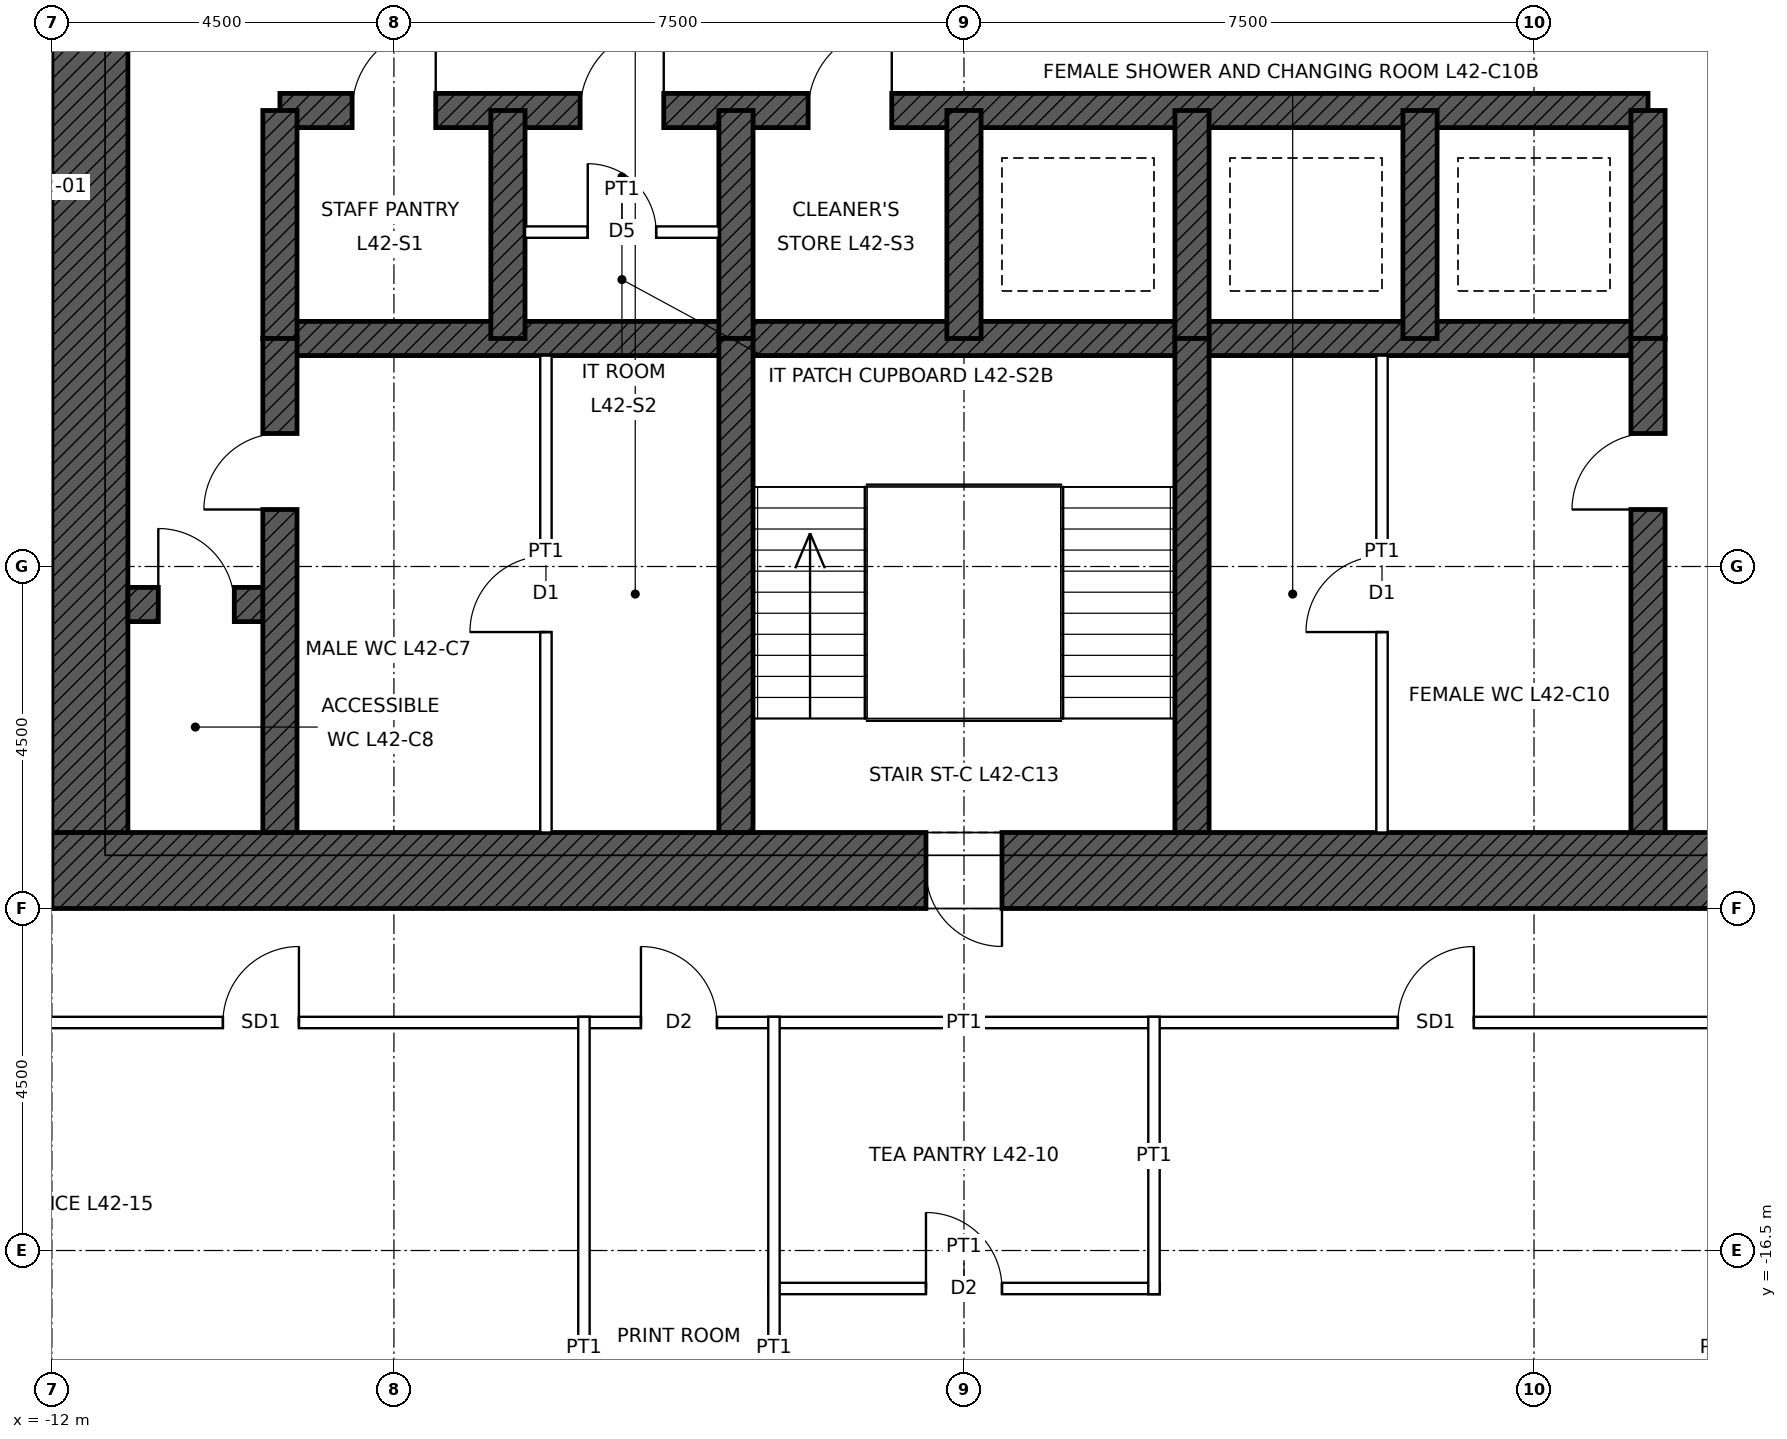
"""IFC4 building model, lengths in metres.
Left out: names, types, materials, properties, quantities, classifications, styles, units other than length and angle.
Written with IfcOpenShell. Run it as: python <this file> out.ifc"""

import sys

from ifc_helpers import new_model, si_unit, direction, frame, frame_2d, origin, place, context, subcontext, project, spatial, rectangle, extrude, element, fill, save


model = new_model("IFC4")
c1 = context("Model", 3, precision=1e-05, world=origin(), true_north=direction((0.0, 1.0)))
c2 = subcontext(c1, "Body", "Model", "MODEL_VIEW")
j1 = project(units=[si_unit("LENGTHUNIT", "METRE"), si_unit("PLANEANGLEUNIT", "RADIAN")], contexts=[c1])
p1 = place(None, origin())
s1 = spatial("IfcSite", under=j1, at=p1, CompositionType="ELEMENT")
p2 = place(p1, origin())
s2 = spatial("IfcBuilding", under=s1, at=p2, CompositionType="ELEMENT")
p3 = place(p2, frame((0.0, 0.0, 201.9)))
s3 = spatial("IfcBuildingStorey", under=s2, at=p3, CompositionType="ELEMENT", Elevation=201.9)
p4 = place(p3, frame((12.0, -11.5, 0.0), z_axis=(0.0, 0.0, 1.0), x_axis=(-1.0, 0.0, 0.0)))
e1 = element("IfcWall", 1, at=p4, inside=s3, PredefinedType="SHEAR", context=c2, shape_type="SweptSolid", body=[
    extrude(rectangle(XDim=24.0, YDim=1.0, at=frame_2d((12.0, 0.0))), origin(), (0.0, 0.0, 1.0), 4.0),
])
p5 = place(p4, frame((11.5, 0.0, 0.0)))
e2 = element("IfcOpeningElement", 2, at=p5, cuts=e1, PredefinedType="OPENING", context=c2, shape_type="SweptSolid", body=[
    extrude(rectangle(XDim=1.0, YDim=2.1, at=frame_2d((0.5, 1.05))), frame((0.0, 0.51, 0.0), z_axis=(0.0, -1.0, 0.0), x_axis=(1.0, 0.0, 0.0)), (0.0, 0.0, 1.0), 1.02),
])
p6 = place(p4, frame((1.0, 0.0, 0.0)))
e3 = element("IfcOpeningElement", 3, at=p6, cuts=e1, PredefinedType="OPENING", context=c2, shape_type="SweptSolid", body=[
    extrude(rectangle(XDim=1.0, YDim=2.4, at=frame_2d((0.5, 1.2))), frame((0.0, 0.51, 0.0), z_axis=(0.0, -1.0, 0.0), x_axis=(1.0, 0.0, 0.0)), (0.0, 0.0, 1.0), 1.02),
])
p7 = place(p3, frame((-11.5, -11.0, 0.0), z_axis=(0.0, 0.0, 1.0), x_axis=(0.0, 1.0, 0.0)))
e4 = element("IfcWall", 4, at=p7, inside=s3, PredefinedType="SHEAR", context=c2, shape_type="SweptSolid", body=[
    extrude(rectangle(XDim=22.0, YDim=1.0, at=frame_2d((11.0, 0.0))), origin(), (0.0, 0.0, 1.0), 4.0),
])
p8 = place(p7, frame((10.5, 0.0, 0.0)))
e5 = element("IfcOpeningElement", 5, at=p8, cuts=e4, PredefinedType="OPENING", context=c2, shape_type="SweptSolid", body=[
    extrude(rectangle(XDim=1.0, YDim=2.4, at=frame_2d((0.5, 1.2))), frame((0.0, 0.51, 0.0), z_axis=(0.0, -1.0, 0.0), x_axis=(1.0, 0.0, 0.0)), (0.0, 0.0, 1.0), 1.02),
])
p9 = place(p3, frame((-9.0, -1.5, 0.0), z_axis=(0.0, 0.0, 1.0), x_axis=(1.0, 0.0, 0.0)))
e6 = element("IfcWall", 6, at=p9, inside=s3, PredefinedType="SHEAR", context=c2, shape_type="SweptSolid", body=[
    extrude(rectangle(XDim=18.0, YDim=0.45, at=frame_2d((9.0, 0.0))), origin(), (0.0, 0.0, 1.0), 4.0),
])
p10 = place(p9, frame((0.95, 0.0, 0.0)))
e7 = element("IfcOpeningElement", 7, at=p10, cuts=e6, PredefinedType="OPENING", context=c2, shape_type="SweptSolid", body=[
    extrude(rectangle(XDim=1.1, YDim=2.1, at=frame_2d((0.55, 1.05))), frame((0.0, 0.235, 0.0), z_axis=(0.0, -1.0, 0.0), x_axis=(1.0, 0.0, 0.0)), (0.0, 0.0, 1.0), 0.47),
])
p11 = place(p9, frame((3.95, 0.0, 0.0)))
e8 = element("IfcOpeningElement", 8, at=p11, cuts=e6, PredefinedType="OPENING", context=c2, shape_type="SweptSolid", body=[
    extrude(rectangle(XDim=1.1, YDim=2.1, at=frame_2d((0.55, 1.05))), frame((0.0, 0.235, 0.0), z_axis=(0.0, -1.0, 0.0), x_axis=(1.0, 0.0, 0.0)), (0.0, 0.0, 1.0), 0.47),
])
p12 = place(p9, frame((6.95, 0.0, 0.0)))
e9 = element("IfcOpeningElement", 9, at=p12, cuts=e6, PredefinedType="OPENING", context=c2, shape_type="SweptSolid", body=[
    extrude(rectangle(XDim=1.1, YDim=2.1, at=frame_2d((0.55, 1.05))), frame((0.0, 0.235, 0.0), z_axis=(0.0, -1.0, 0.0), x_axis=(1.0, 0.0, 0.0)), (0.0, 0.0, 1.0), 0.47),
])
p13 = place(p3, frame((-9.0, -4.5, 0.0), z_axis=(0.0, 0.0, 1.0), x_axis=(1.0, 0.0, 0.0)))
e10 = element("IfcWall", 10, at=p13, inside=s3, PredefinedType="SHEAR", context=c2, shape_type="SweptSolid", body=[
    extrude(rectangle(XDim=18.0, YDim=0.45, at=frame_2d((9.0, 0.0))), origin(), (0.0, 0.0, 1.0), 4.0),
])
p14 = place(p3, frame((-11.0, -8.0, 0.0), z_axis=(0.0, 0.0, 1.0), x_axis=(1.0, 0.0, 0.0)))
e11 = element("IfcWall", 11, at=p14, inside=s3, PredefinedType="SHEAR", context=c2, shape_type="SweptSolid", body=[
    extrude(rectangle(XDim=2.0, YDim=0.45, at=frame_2d((1.0, 0.0))), origin(), (0.0, 0.0, 1.0), 4.0),
])
p15 = place(p14, frame((0.4, 0.0, 0.0)))
e12 = element("IfcOpeningElement", 12, at=p15, cuts=e11, PredefinedType="OPENING", context=c2, shape_type="SweptSolid", body=[
    extrude(rectangle(XDim=1.0, YDim=2.1, at=frame_2d((0.5, 1.05))), frame((0.0, 0.235, 0.0), z_axis=(0.0, -1.0, 0.0), x_axis=(1.0, 0.0, 0.0)), (0.0, 0.0, 1.0), 0.47),
])
for number, where, z_axis, x_axis in (
    (13, (-9.0, -4.5, 0.0), (0.0, 0.0, 1.0), (0.0, 1.0, 0.0)),
    (14, (9.0, -4.5, 0.0), (0.0, 0.0, 1.0), (0.0, 1.0, 0.0)),
    (15, (-6.0, -4.5, 0.0), (0.0, 0.0, 1.0), (0.0, 1.0, 0.0)),
    (16, (-3.0, -4.5, 0.0), (0.0, 0.0, 1.0), (0.0, 1.0, 0.0)),
    (17, (0.0, -4.5, 0.0), (0.0, 0.0, 1.0), (0.0, 1.0, 0.0)),
    (18, (3.0, -4.5, 0.0), (0.0, 0.0, 1.0), (0.0, 1.0, 0.0)),
    (19, (6.0, -4.5, 0.0), (0.0, 0.0, 1.0), (0.0, 1.0, 0.0)),
):
    element("IfcWall", number, at=place(p3, frame(where, z_axis=z_axis, x_axis=x_axis)), inside=s3, PredefinedType="SHEAR", context=c2, shape_type="SweptSolid", body=[
        extrude(rectangle(XDim=3.0, YDim=0.45, at=frame_2d((1.5, 0.0))), origin(), (0.0, 0.0, 1.0), 4.0),
    ])
p16 = place(p3, frame((-9.0, -11.0, 0.0), z_axis=(0.0, 0.0, 1.0), x_axis=(0.0, 1.0, 0.0)))
e20 = element("IfcWall", 20, at=p16, inside=s3, PredefinedType="SHEAR", context=c2, shape_type="SweptSolid", body=[
    extrude(rectangle(XDim=6.5, YDim=0.45, at=frame_2d((3.25, 0.0))), origin(), (0.0, 0.0, 1.0), 4.0),
])
p17 = place(p16, frame((4.25, 0.0, 0.0)))
e21 = element("IfcOpeningElement", 21, at=p17, cuts=e20, PredefinedType="OPENING", context=c2, shape_type="SweptSolid", body=[
    extrude(rectangle(XDim=1.0, YDim=2.1, at=frame_2d((0.5, 1.05))), frame((0.0, 0.235, 0.0), z_axis=(0.0, -1.0, 0.0), x_axis=(1.0, 0.0, 0.0)), (0.0, 0.0, 1.0), 0.47),
])
p18 = place(p3, frame((9.0, -11.0, 0.0), z_axis=(0.0, 0.0, 1.0), x_axis=(0.0, 1.0, 0.0)))
e22 = element("IfcWall", 22, at=p18, inside=s3, PredefinedType="SHEAR", context=c2, shape_type="SweptSolid", body=[
    extrude(rectangle(XDim=6.5, YDim=0.45, at=frame_2d((3.25, 0.0))), origin(), (0.0, 0.0, 1.0), 4.0),
])
p19 = place(p18, frame((4.25, 0.0, 0.0)))
e23 = element("IfcOpeningElement", 23, at=p19, cuts=e22, PredefinedType="OPENING", context=c2, shape_type="SweptSolid", body=[
    extrude(rectangle(XDim=1.0, YDim=2.1, at=frame_2d((0.5, 1.05))), frame((0.0, 0.235, 0.0), z_axis=(0.0, -1.0, 0.0), x_axis=(1.0, 0.0, 0.0)), (0.0, 0.0, 1.0), 0.47),
])
for number, where, z_axis, x_axis in (
    (24, (-3.0, -11.0, 0.0), (0.0, 0.0, 1.0), (0.0, 1.0, 0.0)),
    (25, (3.0, -11.0, 0.0), (0.0, 0.0, 1.0), (0.0, 1.0, 0.0)),
):
    element("IfcWall", number, at=place(p3, frame(where, z_axis=z_axis, x_axis=x_axis)), inside=s3, PredefinedType="SHEAR", context=c2, shape_type="SweptSolid", body=[
        extrude(rectangle(XDim=6.5, YDim=0.45, at=frame_2d((3.25, 0.0))), origin(), (0.0, 0.0, 1.0), 4.0),
    ])
p20 = place(p3, frame((-2.575, -17.0, 0.0), z_axis=(0.0, 0.0, 1.0), x_axis=(1.0, 0.0, 0.0)))
e26 = element("IfcWall", 26, at=p20, inside=s3, PredefinedType="PARTITIONING", context=c2, shape_type="SweptSolid", body=[
    extrude(rectangle(XDim=5.15, YDim=0.15, at=frame_2d((2.575, 0.0))), origin(), (0.0, 0.0, 1.0), 3.85),
])
p21 = place(p20, frame((2.075, 0.0, 0.0)))
e27 = element("IfcOpeningElement", 27, at=p21, cuts=e26, PredefinedType="OPENING", context=c2, shape_type="SweptSolid", body=[
    extrude(rectangle(XDim=1.0, YDim=2.1, at=frame_2d((0.5, 1.05))), frame((0.0, 0.085, 0.0), z_axis=(0.0, -1.0, 0.0), x_axis=(1.0, 0.0, 0.0)), (0.0, 0.0, 1.0), 0.17),
])
p22 = place(p3, frame((-13.575, -13.5, 0.0), z_axis=(0.0, 0.0, 1.0), x_axis=(1.0, 0.0, 0.0)))
e28 = element("IfcWall", 28, at=p22, inside=s3, PredefinedType="PARTITIONING", context=c2, shape_type="SweptSolid", body=[
    extrude(rectangle(XDim=27.15, YDim=0.15, at=frame_2d((13.575, 0.0))), origin(), (0.0, 0.0, 1.0), 3.85),
])
p23 = place(p22, frame((19.283, 0.0, 0.0)))
e29 = element("IfcOpeningElement", 29, at=p23, cuts=e28, PredefinedType="OPENING", context=c2, shape_type="SweptSolid", body=[
    extrude(rectangle(XDim=1.0, YDim=2.4, at=frame_2d((0.5, 1.2))), frame((0.0, 0.085, 0.0), z_axis=(0.0, -1.0, 0.0), x_axis=(1.0, 0.0, 0.0)), (0.0, 0.0, 1.0), 0.17),
])
p24 = place(p22, frame((9.325, 0.0, 0.0)))
e30 = element("IfcOpeningElement", 30, at=p24, cuts=e28, PredefinedType="OPENING", context=c2, shape_type="SweptSolid", body=[
    extrude(rectangle(XDim=1.0, YDim=2.1, at=frame_2d((0.5, 1.05))), frame((0.0, 0.085, 0.0), z_axis=(0.0, -1.0, 0.0), x_axis=(1.0, 0.0, 0.0)), (0.0, 0.0, 1.0), 0.17),
])
p25 = place(p22, frame((3.825, 0.0, 0.0)))
e31 = element("IfcOpeningElement", 31, at=p25, cuts=e28, PredefinedType="OPENING", context=c2, shape_type="SweptSolid", body=[
    extrude(rectangle(XDim=1.0, YDim=2.4, at=frame_2d((0.5, 1.2))), frame((0.0, 0.085, 0.0), z_axis=(0.0, -1.0, 0.0), x_axis=(1.0, 0.0, 0.0)), (0.0, 0.0, 1.0), 0.17),
])
p26 = place(p22, frame((25.318, 0.0, 0.0)))
e32 = element("IfcOpeningElement", 32, at=p26, cuts=e28, PredefinedType="OPENING", context=c2, shape_type="SweptSolid", body=[
    extrude(rectangle(XDim=1.0, YDim=2.4, at=frame_2d((0.5, 1.2))), frame((0.0, 0.085, 0.0), z_axis=(0.0, -1.0, 0.0), x_axis=(1.0, 0.0, 0.0)), (0.0, 0.0, 1.0), 0.17),
])
for number, where, z_axis, x_axis in (
    (33, (-5.0, -22.15, 0.0), (0.0, 0.0, 1.0), (0.0, 1.0, 0.0)),
    (34, (-2.5, -22.15, 0.0), (0.0, 0.0, 1.0), (0.0, 1.0, 0.0)),
):
    element("IfcWall", number, at=place(p3, frame(where, z_axis=z_axis, x_axis=x_axis)), inside=s3, PredefinedType="PARTITIONING", context=c2, shape_type="SweptSolid", body=[
        extrude(rectangle(XDim=8.725, YDim=0.15, at=frame_2d((4.362, 0.0))), origin(), (0.0, 0.0, 1.0), 3.85),
    ])
p27 = place(p3, frame((2.5, -17.075, 0.0), z_axis=(0.0, 0.0, 1.0), x_axis=(0.0, 1.0, 0.0)))
e35 = element("IfcWall", 35, at=p27, inside=s3, PredefinedType="PARTITIONING", context=c2, shape_type="SweptSolid", body=[
    extrude(rectangle(XDim=3.65, YDim=0.15, at=frame_2d((1.825, 0.0))), origin(), (0.0, 0.0, 1.0), 3.85),
])
p28 = place(p3, frame((-5.5, -11.0, 0.0), z_axis=(0.0, 0.0, 1.0), x_axis=(0.0, 1.0, 0.0)))
e36 = element("IfcWall", 36, at=p28, inside=s3, PredefinedType="PARTITIONING", context=c2, shape_type="SweptSolid", body=[
    extrude(rectangle(XDim=6.275, YDim=0.15, at=frame_2d((3.137, 0.0))), origin(), (0.0, 0.0, 1.0), 3.75),
])
p29 = place(p28, frame((2.637, 0.0, 0.0)))
e37 = element("IfcOpeningElement", 37, at=p29, cuts=e36, PredefinedType="OPENING", context=c2, shape_type="SweptSolid", body=[
    extrude(rectangle(XDim=1.0, YDim=2.1, at=frame_2d((0.5, 1.05))), frame((0.0, 0.085, 0.0), z_axis=(0.0, -1.0, 0.0), x_axis=(1.0, 0.0, 0.0)), (0.0, 0.0, 1.0), 0.17),
])
p30 = place(p3, frame((5.5, -11.0, 0.0), z_axis=(0.0, 0.0, 1.0), x_axis=(0.0, 1.0, 0.0)))
e38 = element("IfcWall", 38, at=p30, inside=s3, PredefinedType="PARTITIONING", context=c2, shape_type="SweptSolid", body=[
    extrude(rectangle(XDim=6.275, YDim=0.15, at=frame_2d((3.137, 0.0))), origin(), (0.0, 0.0, 1.0), 3.75),
])
p31 = place(p30, frame((2.637, 0.0, 0.0)))
e39 = element("IfcOpeningElement", 39, at=p31, cuts=e38, PredefinedType="OPENING", context=c2, shape_type="SweptSolid", body=[
    extrude(rectangle(XDim=1.0, YDim=2.1, at=frame_2d((0.5, 1.05))), frame((0.0, 0.085, 0.0), z_axis=(0.0, -1.0, 0.0), x_axis=(1.0, 0.0, 0.0)), (0.0, 0.0, 1.0), 0.17),
])
p32 = place(p3, frame((-5.775, -3.1, 0.0), z_axis=(0.0, 0.0, 1.0), x_axis=(1.0, 0.0, 0.0)))
e40 = element("IfcWall", 40, at=p32, inside=s3, PredefinedType="PARTITIONING", context=c2, shape_type="SweptSolid", body=[
    extrude(rectangle(XDim=2.55, YDim=0.15, at=frame_2d((1.275, 0.0))), origin(), (0.0, 0.0, 1.0), 3.75),
])
p33 = place(p32, frame((0.825, 0.0, 0.0)))
e41 = element("IfcOpeningElement", 41, at=p33, cuts=e40, PredefinedType="OPENING", context=c2, shape_type="SweptSolid", body=[
    extrude(rectangle(XDim=0.9, YDim=2.1, at=frame_2d((0.45, 1.05))), frame((0.0, 0.085, 0.0), z_axis=(0.0, -1.0, 0.0), x_axis=(1.0, 0.0, 0.0)), (0.0, 0.0, 1.0), 0.17),
])
p34 = place(p5, origin())
e42 = element("IfcDoor", 42, at=p34, inside=s3, OperationType="SINGLE_SWING_LEFT", PredefinedType="DOOR", context=c2, shape_type="SweptSolid", body=[
    extrude(rectangle(XDim=1.0, YDim=2.1, at=frame_2d((0.5, 1.05))), frame((0.0, 0.485, 0.0), z_axis=(0.0, -1.0, 0.0), x_axis=(1.0, 0.0, 0.0)), (0.0, 0.0, 1.0), 0.05),
])
fill(e2, e42)
p35 = place(p17, origin())
e43 = element("IfcDoor", 43, at=p35, inside=s3, OperationType="SINGLE_SWING_LEFT", PredefinedType="DOOR", context=c2, shape_type="SweptSolid", body=[
    extrude(rectangle(XDim=1.0, YDim=2.1, at=frame_2d((0.5, 1.05))), frame((0.0, 0.025, 0.0), z_axis=(0.0, -1.0, 0.0), x_axis=(1.0, 0.0, 0.0)), (0.0, 0.0, 1.0), 0.05),
])
fill(e21, e43)
p36 = place(p19, origin())
e44 = element("IfcDoor", 44, at=p36, inside=s3, OperationType="SINGLE_SWING_LEFT", PredefinedType="DOOR", context=c2, shape_type="SweptSolid", body=[
    extrude(rectangle(XDim=1.0, YDim=2.1, at=frame_2d((0.5, 1.05))), frame((0.0, 0.025, 0.0), z_axis=(0.0, -1.0, 0.0), x_axis=(1.0, 0.0, 0.0)), (0.0, 0.0, 1.0), 0.05),
])
fill(e23, e44)
p37 = place(p15, origin())
e45 = element("IfcDoor", 45, at=p37, inside=s3, OperationType="SINGLE_SWING_LEFT", PredefinedType="DOOR", context=c2, shape_type="SweptSolid", body=[
    extrude(rectangle(XDim=1.0, YDim=2.1, at=frame_2d((0.5, 1.05))), frame((0.0, 0.025, 0.0), z_axis=(0.0, -1.0, 0.0), x_axis=(1.0, 0.0, 0.0)), (0.0, 0.0, 1.0), 0.05),
])
fill(e12, e45)
p38 = place(p29, origin())
e46 = element("IfcDoor", 46, at=p38, inside=s3, OperationType="SINGLE_SWING_LEFT", PredefinedType="DOOR", context=c2, shape_type="SweptSolid", body=[
    extrude(rectangle(XDim=1.0, YDim=2.1, at=frame_2d((0.5, 1.05))), frame((0.0, 0.025, 0.0), z_axis=(0.0, -1.0, 0.0), x_axis=(1.0, 0.0, 0.0)), (0.0, 0.0, 1.0), 0.05),
])
fill(e37, e46)
p39 = place(p31, origin())
e47 = element("IfcDoor", 47, at=p39, inside=s3, OperationType="SINGLE_SWING_LEFT", PredefinedType="DOOR", context=c2, shape_type="SweptSolid", body=[
    extrude(rectangle(XDim=1.0, YDim=2.1, at=frame_2d((0.5, 1.05))), frame((0.0, 0.025, 0.0), z_axis=(0.0, -1.0, 0.0), x_axis=(1.0, 0.0, 0.0)), (0.0, 0.0, 1.0), 0.05),
])
fill(e39, e47)
p40 = place(p10, origin())
e48 = element("IfcDoor", 48, at=p40, inside=s3, OperationType="SINGLE_SWING_RIGHT", PredefinedType="DOOR", context=c2, shape_type="SweptSolid", body=[
    extrude(rectangle(XDim=1.1, YDim=2.1, at=frame_2d((0.55, 1.05))), frame((0.0, 0.025, 0.0), z_axis=(0.0, -1.0, 0.0), x_axis=(1.0, 0.0, 0.0)), (0.0, 0.0, 1.0), 0.05),
])
fill(e7, e48)
p41 = place(p11, origin())
e49 = element("IfcDoor", 49, at=p41, inside=s3, OperationType="SINGLE_SWING_RIGHT", PredefinedType="DOOR", context=c2, shape_type="SweptSolid", body=[
    extrude(rectangle(XDim=1.1, YDim=2.1, at=frame_2d((0.55, 1.05))), frame((0.0, 0.025, 0.0), z_axis=(0.0, -1.0, 0.0), x_axis=(1.0, 0.0, 0.0)), (0.0, 0.0, 1.0), 0.05),
])
fill(e8, e49)
p42 = place(p33, origin())
e50 = element("IfcDoor", 50, at=p42, inside=s3, OperationType="SINGLE_SWING_LEFT", PredefinedType="DOOR", context=c2, shape_type="SweptSolid", body=[
    extrude(rectangle(XDim=0.9, YDim=2.1, at=frame_2d((0.45, 1.05))), frame((0.0, 0.025, 0.0), z_axis=(0.0, -1.0, 0.0), x_axis=(1.0, 0.0, 0.0)), (0.0, 0.0, 1.0), 0.05),
])
fill(e41, e50)
p43 = place(p12, origin())
e51 = element("IfcDoor", 51, at=p43, inside=s3, OperationType="SINGLE_SWING_RIGHT", PredefinedType="DOOR", context=c2, shape_type="SweptSolid", body=[
    extrude(rectangle(XDim=1.1, YDim=2.1, at=frame_2d((0.55, 1.05))), frame((0.0, 0.025, 0.0), z_axis=(0.0, -1.0, 0.0), x_axis=(1.0, 0.0, 0.0)), (0.0, 0.0, 1.0), 0.05),
])
fill(e9, e51)
p44 = place(p23, origin())
e52 = element("IfcDoor", 52, at=p44, inside=s3, OperationType="SINGLE_SWING_RIGHT", PredefinedType="DOOR", context=c2, shape_type="SweptSolid", body=[
    extrude(rectangle(XDim=1.0, YDim=2.4, at=frame_2d((0.5, 1.2))), frame((0.0, 0.025, 0.0), z_axis=(0.0, -1.0, 0.0), x_axis=(1.0, 0.0, 0.0)), (0.0, 0.0, 1.0), 0.05),
])
fill(e29, e52)
p45 = place(p21, origin())
e53 = element("IfcDoor", 53, at=p45, inside=s3, OperationType="SINGLE_SWING_LEFT", PredefinedType="DOOR", context=c2, shape_type="SweptSolid", body=[
    extrude(rectangle(XDim=1.0, YDim=2.1, at=frame_2d((0.5, 1.05))), frame((0.0, 0.025, 0.0), z_axis=(0.0, -1.0, 0.0), x_axis=(1.0, 0.0, 0.0)), (0.0, 0.0, 1.0), 0.05),
])
fill(e27, e53)
p46 = place(p24, origin())
e54 = element("IfcDoor", 54, at=p46, inside=s3, OperationType="SINGLE_SWING_LEFT", PredefinedType="DOOR", context=c2, shape_type="SweptSolid", body=[
    extrude(rectangle(XDim=1.0, YDim=2.1, at=frame_2d((0.5, 1.05))), frame((0.0, 0.025, 0.0), z_axis=(0.0, -1.0, 0.0), x_axis=(1.0, 0.0, 0.0)), (0.0, 0.0, 1.0), 0.05),
])
fill(e30, e54)
p47 = place(p25, origin())
e55 = element("IfcDoor", 55, at=p47, inside=s3, OperationType="SINGLE_SWING_RIGHT", PredefinedType="DOOR", context=c2, shape_type="SweptSolid", body=[
    extrude(rectangle(XDim=1.0, YDim=2.4, at=frame_2d((0.5, 1.2))), frame((0.0, 0.025, 0.0), z_axis=(0.0, -1.0, 0.0), x_axis=(1.0, 0.0, 0.0)), (0.0, 0.0, 1.0), 0.05),
])
fill(e31, e55)
save(model, sys.argv[1])
